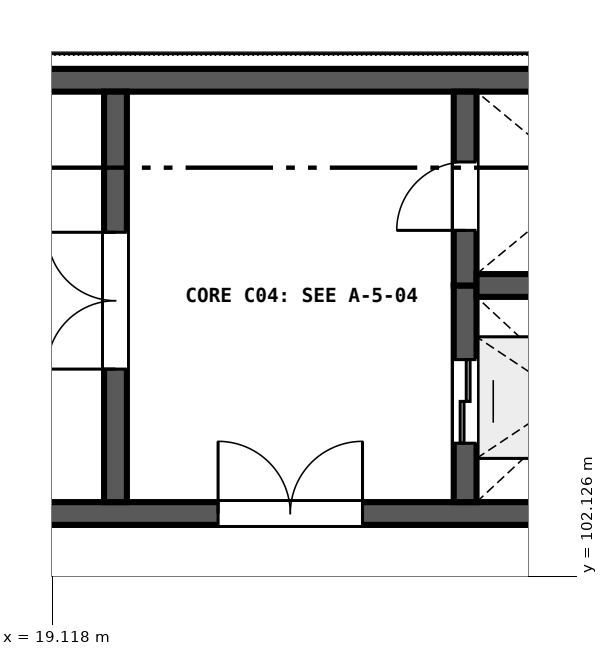
"""IFC4 building model, lengths in metres.
Left out: names, types, materials, properties, quantities, classifications, styles, units other than length and angle.
Written with IfcOpenShell. Run it as: python <this file> out.ifc"""

import sys

from ifc_helpers import new_model, si_unit, direction, frame, frame_2d, origin, place, context, subcontext, project, spatial, rectangle, extrude, element, fill, save


model = new_model("IFC4")
c1 = context("Model", 3, precision=1e-05, world=origin(), true_north=direction((0.0, 1.0)))
c2 = subcontext(c1, "Body", "Model", "MODEL_VIEW")
j1 = project(units=[si_unit("LENGTHUNIT", "METRE"), si_unit("PLANEANGLEUNIT", "RADIAN")], contexts=[c1])
p1 = place(None, origin())
s1 = spatial("IfcSite", under=j1, at=p1, CompositionType="ELEMENT")
p2 = place(p1, origin())
s2 = spatial("IfcBuilding", under=s1, at=p2, CompositionType="ELEMENT")
p3 = place(p2, frame((0.0, 0.0, 19.2)))
s3 = spatial("IfcBuildingStorey", under=s2, at=p3, CompositionType="ELEMENT", Elevation=19.2)
p4 = place(p3, frame((9.9, 102.95, 0.0), z_axis=(0.0, 0.0, 1.0), x_axis=(1.0, 0.0, 0.0)))
e1 = element("IfcWall", 1, at=p4, inside=s3, PredefinedType="SHEAR", context=c2, shape_type="SweptSolid", body=[
    extrude(rectangle(XDim=18.0, YDim=0.3, at=frame_2d((9.0, 0.0))), origin(), (0.0, 0.0, 1.0), 4.55),
])
p5 = place(p4, frame((11.4, 0.0, 0.0)))
e2 = element("IfcOpeningElement", 2, at=p5, cuts=e1, PredefinedType="OPENING", context=c2, shape_type="SweptSolid", body=[
    extrude(rectangle(XDim=1.9, YDim=2.25, at=frame_2d((0.95, 1.125))), frame((0.0, 0.16, 0.0), z_axis=(0.0, -1.0, 0.0), x_axis=(1.0, 0.0, 0.0)), (0.0, 0.0, 1.0), 0.32),
])
p6 = place(p3, frame((27.9, 108.65, 0.0), z_axis=(0.0, 0.0, 1.0), x_axis=(-1.0, 0.0, 0.0)))
e3 = element("IfcWall", 3, at=p6, inside=s3, PredefinedType="SHEAR", context=c2, shape_type="SweptSolid", body=[
    extrude(rectangle(XDim=18.0, YDim=0.3, at=frame_2d((9.0, 0.0))), origin(), (0.0, 0.0, 1.0), 4.55),
])
p7 = place(p3, frame((19.95, 103.1, 0.0), z_axis=(0.0, 0.0, 1.0), x_axis=(0.0, 1.0, 0.0)))
e4 = element("IfcWall", 4, at=p7, inside=s3, PredefinedType="SHEAR", context=c2, shape_type="SweptSolid", body=[
    extrude(rectangle(XDim=5.4, YDim=0.3, at=frame_2d((2.7, 0.0))), origin(), (0.0, 0.0, 1.0), 4.55),
])
p8 = place(p7, frame((1.75, 0.0, 0.0)))
e5 = element("IfcOpeningElement", 5, at=p8, cuts=e4, PredefinedType="OPENING", context=c2, shape_type="SweptSolid", body=[
    extrude(rectangle(XDim=1.8, YDim=2.25, at=frame_2d((0.9, 1.125))), frame((0.0, 0.16, 0.0), z_axis=(0.0, -1.0, 0.0), x_axis=(1.0, 0.0, 0.0)), (0.0, 0.0, 1.0), 0.32),
])
p9 = place(p3, frame((24.55, 103.1, 0.0), z_axis=(0.0, 0.0, 1.0), x_axis=(0.0, 1.0, 0.0)))
e6 = element("IfcWall", 6, at=p9, inside=s3, PredefinedType="SHEAR", context=c2, shape_type="SweptSolid", body=[
    extrude(rectangle(XDim=2.85, YDim=0.3, at=frame_2d((1.425, 0.0))), origin(), (0.0, 0.0, 1.0), 4.55),
])
p10 = place(p9, frame((0.775, 0.0, 0.0)))
e7 = element("IfcOpeningElement", 7, at=p10, cuts=e6, PredefinedType="OPENING", context=c2, shape_type="SweptSolid", body=[
    extrude(rectangle(XDim=1.1, YDim=2.1, at=frame_2d((0.55, 1.05))), frame((0.0, 0.16, 0.0), z_axis=(0.0, -1.0, 0.0), x_axis=(1.0, 0.0, 0.0)), (0.0, 0.0, 1.0), 0.32),
])
p11 = place(p3, frame((24.55, 105.95, 0.0), z_axis=(0.0, 0.0, 1.0), x_axis=(0.0, 1.0, 0.0)))
e8 = element("IfcWall", 8, at=p11, inside=s3, PredefinedType="SHEAR", context=c2, shape_type="SweptSolid", body=[
    extrude(rectangle(XDim=2.55, YDim=0.3, at=frame_2d((1.275, 0.0))), origin(), (0.0, 0.0, 1.0), 4.55),
])
p12 = place(p11, frame((0.725, 0.0, 0.0)))
e9 = element("IfcOpeningElement", 9, at=p12, cuts=e8, PredefinedType="OPENING", context=c2, shape_type="SweptSolid", body=[
    extrude(rectangle(XDim=0.9, YDim=2.1, at=frame_2d((0.45, 1.05))), frame((0.0, 0.16, 0.0), z_axis=(0.0, -1.0, 0.0), x_axis=(1.0, 0.0, 0.0)), (0.0, 0.0, 1.0), 0.32),
])
p13 = place(p3, frame((24.7, 105.95, 0.0), z_axis=(0.0, 0.0, 1.0), x_axis=(1.0, 0.0, 0.0)))
e10 = element("IfcWall", 10, at=p13, inside=s3, PredefinedType="SHEAR", context=c2, shape_type="SweptSolid", body=[
    extrude(rectangle(XDim=2.9, YDim=0.3, at=frame_2d((1.45, 0.0))), origin(), (0.0, 0.0, 1.0), 4.55),
])
p14 = place(p8, origin())
e11 = element("IfcDoor", 11, at=p14, inside=s3, OperationType="DOUBLE_DOOR_SINGLE_SWING", PredefinedType="DOOR", context=c2, shape_type="SweptSolid", body=[
    extrude(rectangle(XDim=1.8, YDim=2.25, at=frame_2d((0.9, 1.125))), frame((0.0, 0.025, 0.0), z_axis=(0.0, -1.0, 0.0), x_axis=(1.0, 0.0, 0.0)), (0.0, 0.0, 1.0), 0.05),
])
fill(e5, e11)
p15 = place(p12, origin())
e12 = element("IfcDoor", 12, at=p15, inside=s3, OperationType="SINGLE_SWING_LEFT", PredefinedType="DOOR", context=c2, shape_type="SweptSolid", body=[
    extrude(rectangle(XDim=0.9, YDim=2.1, at=frame_2d((0.45, 1.05))), frame((0.0, 0.025, 0.0), z_axis=(0.0, -1.0, 0.0), x_axis=(1.0, 0.0, 0.0)), (0.0, 0.0, 1.0), 0.05),
])
fill(e9, e12)
p16 = place(p10, origin())
e13 = element("IfcDoor", 13, at=p16, inside=s3, OperationType="DOUBLE_DOOR_SLIDING", PredefinedType="DOOR", context=c2, shape_type="SweptSolid", body=[
    extrude(rectangle(XDim=1.1, YDim=2.1, at=frame_2d((0.55, 1.05))), frame((0.0, 0.025, 0.0), z_axis=(0.0, -1.0, 0.0), x_axis=(1.0, 0.0, 0.0)), (0.0, 0.0, 1.0), 0.05),
])
fill(e7, e13)
p17 = place(p5, origin())
e14 = element("IfcDoor", 14, at=p17, inside=s3, OperationType="DOUBLE_DOOR_SINGLE_SWING", PredefinedType="DOOR", context=c2, shape_type="SweptSolid", body=[
    extrude(rectangle(XDim=1.9, YDim=2.25, at=frame_2d((0.95, 1.125))), frame((0.0, 0.025, 0.0), z_axis=(0.0, -1.0, 0.0), x_axis=(1.0, 0.0, 0.0)), (0.0, 0.0, 1.0), 0.05),
])
fill(e2, e14)
save(model, sys.argv[1])
